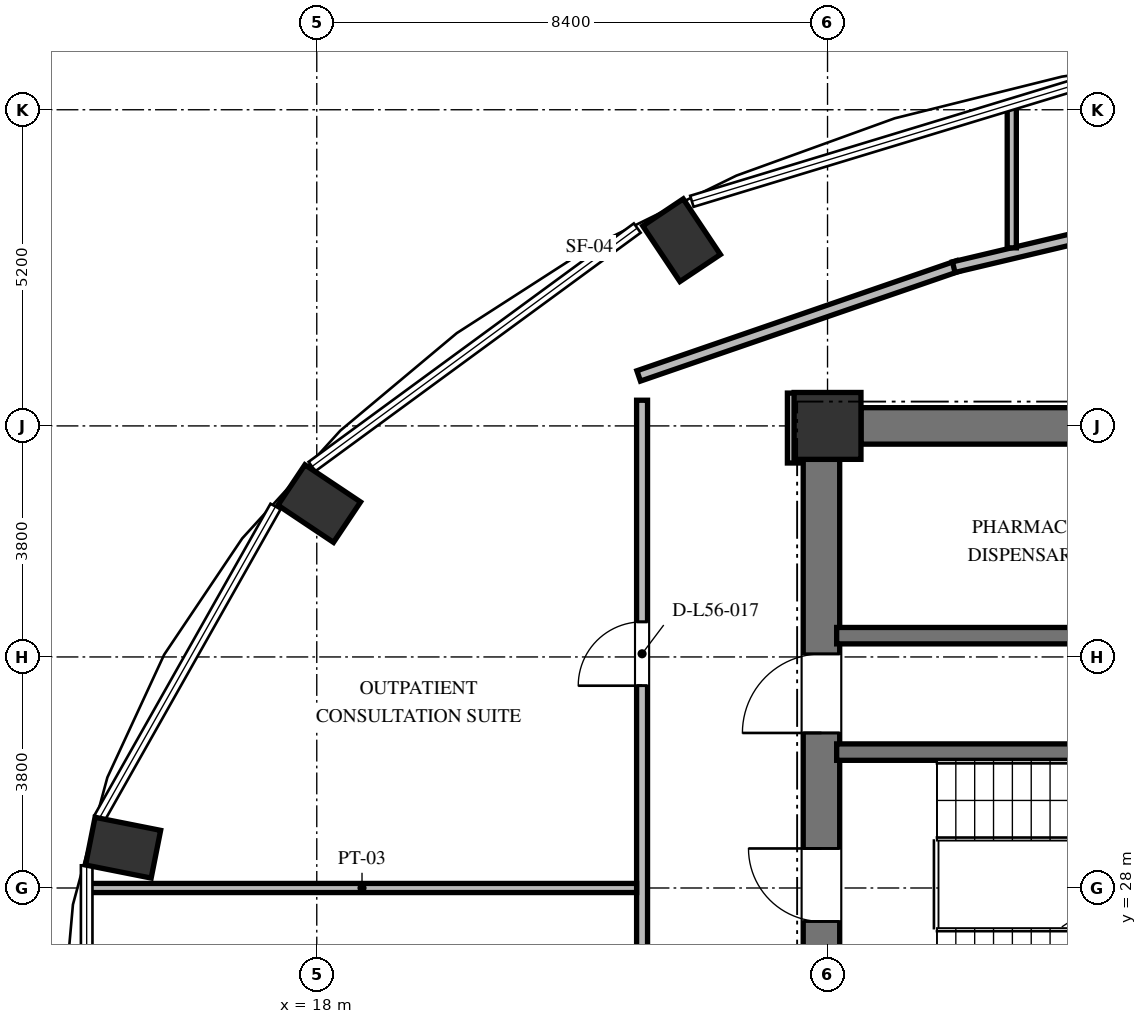
"""IFC4 building model, lengths in metres.
Left out: names, types, materials, properties, quantities, classifications, styles, units other than length and angle.
Written with IfcOpenShell. Run it as: python <this file> out.ifc"""

import sys

from ifc_helpers import new_model, si_unit, direction, frame, frame_2d, origin, origin_2d, place, context, subcontext, project, spatial, rectangle, extrude, element, fill, save


model = new_model("IFC4")
c1 = context("Model", 3, precision=1e-05, world=origin(), true_north=direction((0.0, 1.0)))
c2 = subcontext(c1, "Body", "Model", "MODEL_VIEW")
j1 = project(units=[si_unit("LENGTHUNIT", "METRE"), si_unit("PLANEANGLEUNIT", "RADIAN")], contexts=[c1])
p1 = place(None, origin())
s1 = spatial("IfcSite", under=j1, at=p1, CompositionType="ELEMENT")
p2 = place(p1, origin())
s2 = spatial("IfcBuilding", under=s1, at=p2, CompositionType="ELEMENT")
p3 = place(p2, frame((0.0, 0.0, 216.72)))
s3 = spatial("IfcBuildingStorey", under=s2, at=p3, CompositionType="ELEMENT", Elevation=216.72)
for number, where, z_axis, x_axis in (
    (1, (24.0, 38.654, 0.0), (0.0, 0.0, 1.0), (-0.556, 0.831, 0.0)),
    (2, (18.04, 34.323, 0.0), (0.0, 0.0, 1.0), (-0.831, 0.556, 0.0)),
    (3, (14.815, 28.663, 0.0), (0.0, 0.0, 1.0), (-0.981, 0.195, 0.0)),
):
    element("IfcColumn", number, at=place(p3, frame(where, z_axis=z_axis, x_axis=x_axis)), inside=s3, PredefinedType="COLUMN", context=c2, shape_type="SweptSolid", body=[
        extrude(rectangle(XDim=1.1, YDim=0.8, at=origin_2d()), origin(), (0.0, 0.0, 1.0), 3.648),
    ])
p4 = place(p3, frame((26.4, 35.6, 0.0), z_axis=(0.0, 0.0, 1.0), x_axis=(1.0, 0.0, 0.0)))
e4 = element("IfcColumn", 4, at=p4, inside=s3, PredefinedType="COLUMN", context=c2, shape_type="SweptSolid", body=[
    extrude(rectangle(XDim=1.1, YDim=1.1, at=origin_2d()), origin(), (0.0, 0.0, 1.0), 3.648),
])
p5 = place(p3, frame((26.3, 20.95, 0.0), z_axis=(0.0, 0.0, 1.0), x_axis=(0.0, 1.0, 0.0)))
e5 = element("IfcWall", 5, at=p5, inside=s3, PredefinedType="SHEAR", context=c2, shape_type="SweptSolid", body=[
    extrude(rectangle(XDim=14.1, YDim=0.6, at=frame_2d((7.05, 0.0))), origin(), (0.0, 0.0, 1.0), 3.648),
])
p6 = place(p5, frame((6.5, 0.0, 0.0)))
e6 = element("IfcOpeningElement", 6, at=p6, cuts=e5, PredefinedType="OPENING", context=c2, shape_type="SweptSolid", body=[
    extrude(rectangle(XDim=1.2, YDim=2.15, at=frame_2d((0.6, 1.075))), frame((0.0, 0.31, 0.0), z_axis=(0.0, -1.0, 0.0), x_axis=(1.0, 0.0, 0.0)), (0.0, 0.0, 1.0), 0.62),
])
p7 = place(p5, frame((9.6, 0.0, 0.0)))
e7 = element("IfcOpeningElement", 7, at=p7, cuts=e5, PredefinedType="OPENING", context=c2, shape_type="SweptSolid", body=[
    extrude(rectangle(XDim=1.3, YDim=2.2, at=frame_2d((0.65, 1.1))), frame((0.0, 0.31, 0.0), z_axis=(0.0, -1.0, 0.0), x_axis=(1.0, 0.0, 0.0)), (0.0, 0.0, 1.0), 0.62),
])
p8 = place(p5, frame((3.26, 0.0, 0.0)))
e8 = element("IfcOpeningElement", 8, at=p8, cuts=e5, PredefinedType="OPENING", context=c2, shape_type="SweptSolid", body=[
    extrude(rectangle(XDim=1.3, YDim=2.2, at=frame_2d((0.65, 1.1))), frame((0.0, 0.31, 0.0), z_axis=(0.0, -1.0, 0.0), x_axis=(1.0, 0.0, 0.0)), (0.0, 0.0, 1.0), 0.62),
])
p9 = place(p3, frame((26.95, 35.6, 0.0), z_axis=(0.0, 0.0, 1.0), x_axis=(1.0, 0.0, 0.0)))
e9 = element("IfcWall", 9, at=p9, inside=s3, PredefinedType="SHEAR", context=c2, shape_type="SweptSolid", body=[
    extrude(rectangle(XDim=5.45, YDim=0.6, at=frame_2d((2.725, 0.0))), origin(), (0.0, 0.0, 1.0), 3.648),
])
p10 = place(p3, frame((26.55, 30.235, 0.0), z_axis=(0.0, 0.0, 1.0), x_axis=(1.0, 0.0, 0.0)))
e10 = element("IfcWall", 10, at=p10, inside=s3, PredefinedType="SHEAR", context=c2, shape_type="SweptSolid", body=[
    extrude(rectangle(XDim=7.985, YDim=0.27, at=frame_2d((3.992, 0.0))), origin(), (0.0, 0.0, 1.0), 3.648),
])
p11 = place(p3, frame((26.55, 32.15, 0.0), z_axis=(0.0, 0.0, 1.0), x_axis=(1.0, 0.0, 0.0)))
e11 = element("IfcWall", 11, at=p11, inside=s3, PredefinedType="SHEAR", context=c2, shape_type="SweptSolid", body=[
    extrude(rectangle(XDim=16.4, YDim=0.27, at=frame_2d((8.2, 0.0))), origin(), (0.0, 0.0, 1.0), 3.648),
])
p12 = place(p11, frame((5.125, 0.0, 0.0)))
e12 = element("IfcOpeningElement", 12, at=p12, cuts=e11, PredefinedType="OPENING", context=c2, shape_type="SweptSolid", body=[
    extrude(rectangle(XDim=1.05, YDim=2.15, at=frame_2d((0.525, 1.075))), frame((0.0, 0.145, 0.0), z_axis=(0.0, -1.0, 0.0), x_axis=(1.0, 0.0, 0.0)), (0.0, 0.0, 1.0), 0.29),
])
p13 = place(p11, frame((11.9, 0.0, 0.0)))
e13 = element("IfcOpeningElement", 13, at=p13, cuts=e11, PredefinedType="OPENING", context=c2, shape_type="SweptSolid", body=[
    extrude(rectangle(XDim=1.1, YDim=2.2, at=frame_2d((0.55, 1.1))), frame((0.0, 0.145, 0.0), z_axis=(0.0, -1.0, 0.0), x_axis=(1.0, 0.0, 0.0)), (0.0, 0.0, 1.0), 0.29),
])
p14 = place(p11, frame((14.5, 0.0, 0.0)))
e14 = element("IfcOpeningElement", 14, at=p14, cuts=e11, PredefinedType="OPENING", context=c2, shape_type="SweptSolid", body=[
    extrude(rectangle(XDim=1.1, YDim=2.2, at=frame_2d((0.55, 1.1))), frame((0.0, 0.145, 0.0), z_axis=(0.0, -1.0, 0.0), x_axis=(1.0, 0.0, 0.0)), (0.0, 0.0, 1.0), 0.29),
])
p15 = place(p3, frame((23.294, 36.422, 0.0), z_axis=(0.0, 0.0, 1.0), x_axis=(0.945493277461, 0.325641616316, 0.0)))
e15 = element("IfcWall", 15, at=p15, inside=s3, PredefinedType="PARTITIONING", context=c2, shape_type="SweptSolid", body=[
    extrude(rectangle(XDim=5.562, YDim=0.18, at=frame_2d((2.781, 0.0))), origin(), (0.0, 0.0, 1.0), 3.073),
])
p16 = place(p3, frame((28.476, 38.211, 0.0), z_axis=(0.0, 0.0, 1.0), x_axis=(0.973030562203, 0.230676234189, 0.0)))
e16 = element("IfcWall", 16, at=p16, inside=s3, PredefinedType="PARTITIONING", context=c2, shape_type="SweptSolid", body=[
    extrude(rectangle(XDim=2.377, YDim=0.18, at=frame_2d((1.188, 0.0))), origin(), (0.0, 0.0, 1.0), 3.448),
])
p17 = place(p3, frame((25.83, 36.14, 0.0), z_axis=(0.0, 0.0, 1.0), x_axis=(0.0, -1.0, 0.0)))
e17 = element("IfcWall", 17, at=p17, inside=s3, PredefinedType="PARTITIONING", context=c2, shape_type="SweptSolid", body=[
    extrude(rectangle(XDim=1.15, YDim=0.18, at=frame_2d((0.575, 0.0))), origin(), (0.0, 0.0, 1.0), 3.448),
])
p18 = place(p3, frame((23.35, 19.98, 0.0), z_axis=(0.0, 0.0, 1.0), x_axis=(0.0, 1.0, 0.0)))
e18 = element("IfcWall", 18, at=p18, inside=s3, PredefinedType="PARTITIONING", context=c2, shape_type="SweptSolid", body=[
    extrude(rectangle(XDim=16.042, YDim=0.18, at=frame_2d((8.021, 0.0))), origin(), (0.0, 0.0, 1.0), 3.448),
])
p19 = place(p18, frame((3.469, 0.0, 0.0)))
e19 = element("IfcOpeningElement", 19, at=p19, cuts=e18, PredefinedType="OPENING", context=c2, shape_type="SweptSolid", body=[
    extrude(rectangle(XDim=1.4, YDim=2.2, at=frame_2d((0.7, 1.1))), frame((0.0, 0.1, 0.0), z_axis=(0.0, -1.0, 0.0), x_axis=(1.0, 0.0, 0.0)), (0.0, 0.0, 1.0), 0.2),
])
p20 = place(p18, frame((11.347, 0.0, 0.0)))
e20 = element("IfcOpeningElement", 20, at=p20, cuts=e18, PredefinedType="OPENING", context=c2, shape_type="SweptSolid", body=[
    extrude(rectangle(XDim=1.05, YDim=2.15, at=frame_2d((0.525, 1.075))), frame((0.0, 0.1, 0.0), z_axis=(0.0, -1.0, 0.0), x_axis=(1.0, 0.0, 0.0)), (0.0, 0.0, 1.0), 0.2),
])
p21 = place(p3, frame((14.228, 28.0, 0.0), z_axis=(0.0, 0.0, 1.0), x_axis=(1.0, 0.0, 0.0)))
e21 = element("IfcWall", 21, at=p21, inside=s3, PredefinedType="PARTITIONING", context=c2, shape_type="SweptSolid", body=[
    extrude(rectangle(XDim=9.032, YDim=0.15, at=frame_2d((4.516, 0.0))), origin(), (0.0, 0.0, 1.0), 3.448),
])
p22 = place(p3, frame((29.43, 38.529, 0.0), z_axis=(0.0, 0.0, 1.0), x_axis=(0.0, 1.0, 0.0)))
e22 = element("IfcWall", 22, at=p22, inside=s3, PredefinedType="PARTITIONING", context=c2, shape_type="SweptSolid", body=[
    extrude(rectangle(XDim=2.346, YDim=0.15, at=frame_2d((1.173, 0.0))), origin(), (0.0, 0.0, 1.0), 3.448),
])
p23 = place(p6, origin())
e23 = element("IfcDoor", 23, at=p23, inside=s3, OperationType="SINGLE_SWING_RIGHT", PredefinedType="DOOR", context=c2, shape_type="SweptSolid", body=[
    extrude(rectangle(XDim=1.2, YDim=2.15, at=frame_2d((0.6, 1.075))), frame((0.0, 0.025, 0.0), z_axis=(0.0, -1.0, 0.0), x_axis=(1.0, 0.0, 0.0)), (0.0, 0.0, 1.0), 0.05),
])
fill(e6, e23)
p24 = place(p7, origin())
e24 = element("IfcDoor", 24, at=p24, inside=s3, OperationType="SINGLE_SWING_LEFT", PredefinedType="DOOR", context=c2, shape_type="SweptSolid", body=[
    extrude(rectangle(XDim=1.3, YDim=2.2, at=frame_2d((0.65, 1.1))), frame((0.0, 0.025, 0.0), z_axis=(0.0, -1.0, 0.0), x_axis=(1.0, 0.0, 0.0)), (0.0, 0.0, 1.0), 0.05),
])
fill(e7, e24)
p25 = place(p20, origin())
e25 = element("IfcDoor", 25, at=p25, inside=s3, OperationType="SINGLE_SWING_LEFT", PredefinedType="DOOR", context=c2, shape_type="SweptSolid", body=[
    extrude(rectangle(XDim=1.05, YDim=2.15, at=frame_2d((0.525, 1.075))), frame((0.0, 0.025, 0.0), z_axis=(0.0, -1.0, 0.0), x_axis=(1.0, 0.0, 0.0)), (0.0, 0.0, 1.0), 0.05),
])
fill(e20, e25)
save(model, sys.argv[1])
